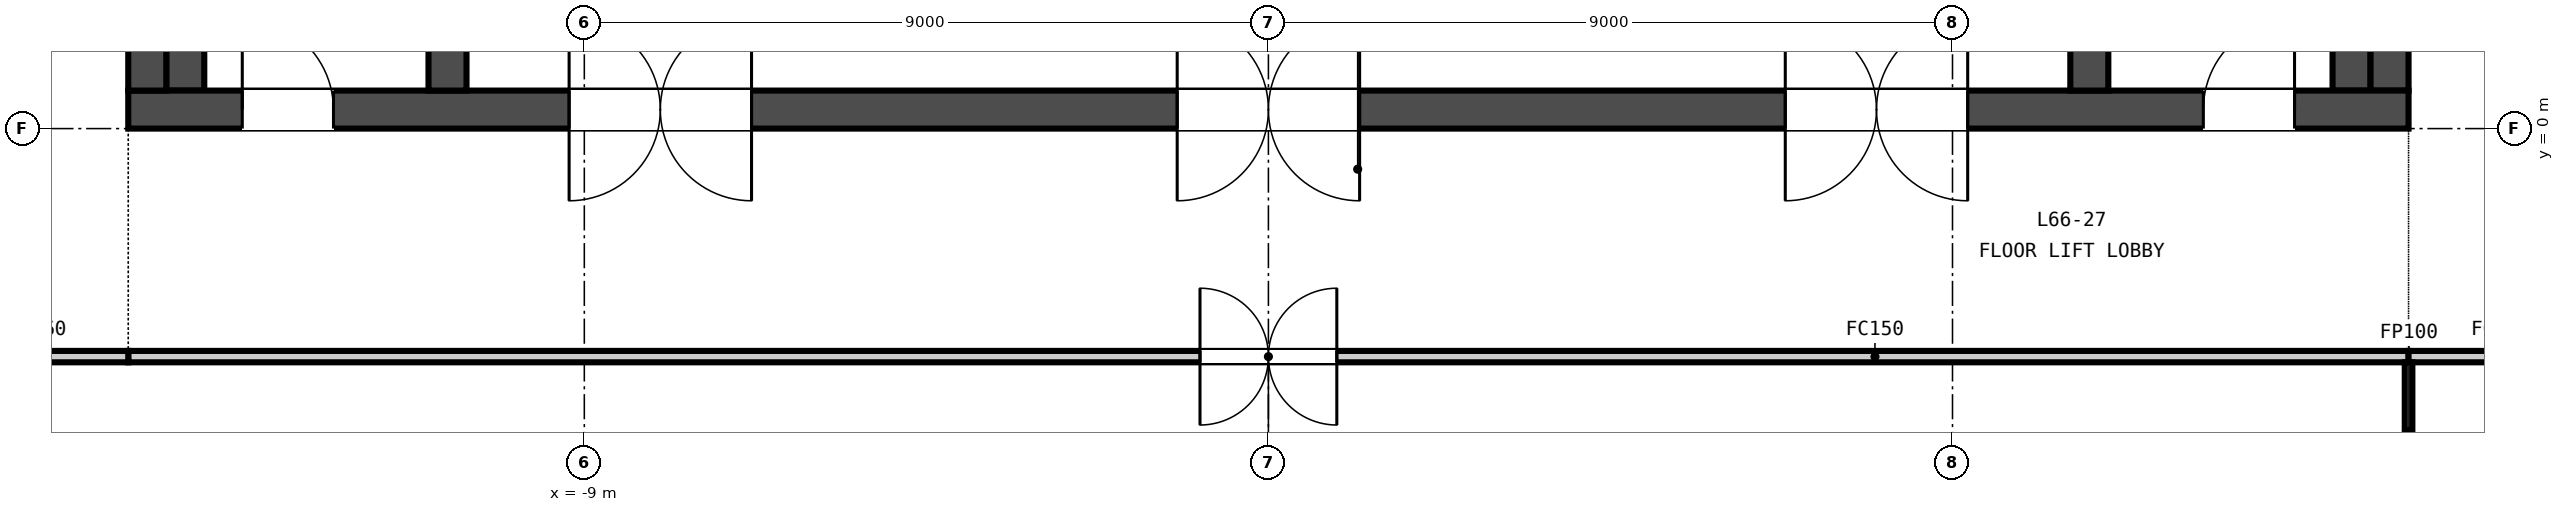
"""IFC4 building model, lengths in metres.
Left out: names, types, materials, properties, quantities, classifications, styles, units other than length and angle.
Written with IfcOpenShell. Run it as: python <this file> out.ifc"""

import sys

from ifc_helpers import new_model, si_unit, direction, frame, frame_2d, origin, place, context, subcontext, project, spatial, rectangle, extrude, element, fill, save


model = new_model("IFC4")
c1 = context("Model", 3, precision=1e-05, world=origin(), true_north=direction((0.0, 1.0)))
c2 = subcontext(c1, "Body", "Model", "MODEL_VIEW")
j1 = project(units=[si_unit("LENGTHUNIT", "METRE"), si_unit("PLANEANGLEUNIT", "RADIAN")], contexts=[c1])
p1 = place(None, origin())
s1 = spatial("IfcSite", under=j1, at=p1, CompositionType="ELEMENT")
p2 = place(p1, origin())
s2 = spatial("IfcBuilding", under=s1, at=p2, CompositionType="ELEMENT")
p3 = place(p2, frame((0.0, 0.0, 260.95)))
s3 = spatial("IfcBuildingStorey", under=s2, at=p3, CompositionType="ELEMENT", Elevation=260.95)
p4 = place(p3, frame((-15.0, 0.25, -0.15), z_axis=(0.0, 0.0, 1.0), x_axis=(1.0, 0.0, 0.0)))
e1 = element("IfcWall", 1, at=p4, inside=s3, PredefinedType="SOLIDWALL", context=c2, shape_type="SweptSolid", body=[
    extrude(rectangle(XDim=30.0, YDim=0.5, at=frame_2d((15.0, 0.0))), origin(), (0.0, 0.0, 1.0), 3.65),
])
p5 = place(p4, frame((5.8, 0.0, 0.15)))
e2 = element("IfcOpeningElement", 2, at=p5, cuts=e1, PredefinedType="OPENING", context=c2, shape_type="SweptSolid", body=[
    extrude(rectangle(XDim=2.4, YDim=2.4, at=frame_2d((1.2, 1.2))), frame((0.0, 0.26, 0.0), z_axis=(0.0, -1.0, 0.0), x_axis=(1.0, 0.0, 0.0)), (0.0, 0.0, 1.0), 0.52),
])
p6 = place(p4, frame((13.8, 0.0, 0.15)))
e3 = element("IfcOpeningElement", 3, at=p6, cuts=e1, PredefinedType="OPENING", context=c2, shape_type="SweptSolid", body=[
    extrude(rectangle(XDim=2.4, YDim=2.4, at=frame_2d((1.2, 1.2))), frame((0.0, 0.26, 0.0), z_axis=(0.0, -1.0, 0.0), x_axis=(1.0, 0.0, 0.0)), (0.0, 0.0, 1.0), 0.52),
])
p7 = place(p4, frame((21.8, 0.0, 0.15)))
e4 = element("IfcOpeningElement", 4, at=p7, cuts=e1, PredefinedType="OPENING", context=c2, shape_type="SweptSolid", body=[
    extrude(rectangle(XDim=2.4, YDim=2.4, at=frame_2d((1.2, 1.2))), frame((0.0, 0.26, 0.0), z_axis=(0.0, -1.0, 0.0), x_axis=(1.0, 0.0, 0.0)), (0.0, 0.0, 1.0), 0.52),
])
p8 = place(p4, frame((1.5, 0.0, 0.15)))
e5 = element("IfcOpeningElement", 5, at=p8, cuts=e1, PredefinedType="OPENING", context=c2, shape_type="SweptSolid", body=[
    extrude(rectangle(XDim=1.2, YDim=2.1, at=frame_2d((0.6, 1.05))), frame((0.0, 0.26, 0.0), z_axis=(0.0, -1.0, 0.0), x_axis=(1.0, 0.0, 0.0)), (0.0, 0.0, 1.0), 0.52),
])
p9 = place(p4, frame((27.3, 0.0, 0.15)))
e6 = element("IfcOpeningElement", 6, at=p9, cuts=e1, PredefinedType="OPENING", context=c2, shape_type="SweptSolid", body=[
    extrude(rectangle(XDim=1.2, YDim=2.1, at=frame_2d((0.6, 1.05))), frame((0.0, 0.26, 0.0), z_axis=(0.0, -1.0, 0.0), x_axis=(1.0, 0.0, 0.0)), (0.0, 0.0, 1.0), 0.52),
])
for number, where, z_axis, x_axis in (
    (7, (-14.75, 0.5, -0.15), (0.0, 0.0, 1.0), (0.0, 1.0, 0.0)),
    (8, (14.75, 0.5, -0.15), (0.0, 0.0, 1.0), (0.0, 1.0, 0.0)),
    (9, (-10.8, 0.5, -0.15), (0.0, 0.0, 1.0), (0.0, 1.0, 0.0)),
    (10, (10.8, 0.5, -0.15), (0.0, 0.0, 1.0), (0.0, 1.0, 0.0)),
):
    element("IfcWall", number, at=place(p3, frame(where, z_axis=z_axis, x_axis=x_axis)), inside=s3, PredefinedType="SOLIDWALL", context=c2, shape_type="SweptSolid", body=[
        extrude(rectangle(XDim=14.0, YDim=0.5, at=frame_2d((7.0, 0.0))), origin(), (0.0, 0.0, 1.0), 3.65),
    ])
for number, where, z_axis, x_axis in (
    (11, (-14.25, 0.5, 0.0), (0.0, 0.0, 1.0), (0.0, 1.0, 0.0)),
    (12, (14.25, 0.5, 0.0), (0.0, 0.0, 1.0), (0.0, 1.0, 0.0)),
):
    element("IfcWall", number, at=place(p3, frame(where, z_axis=z_axis, x_axis=x_axis)), inside=s3, PredefinedType="SOLIDWALL", context=c2, shape_type="SweptSolid", body=[
        extrude(rectangle(XDim=14.0, YDim=0.5, at=frame_2d((7.0, 0.0))), origin(), (0.0, 0.0, 1.0), 3.5),
    ])
p10 = place(p3, frame((15.0, -3.0, 0.0), z_axis=(0.0, 0.0, 1.0), x_axis=(-1.0, 0.0, 0.0)))
e13 = element("IfcWall", 13, at=p10, inside=s3, PredefinedType="PARTITIONING", context=c2, shape_type="SweptSolid", body=[
    extrude(rectangle(XDim=30.0, YDim=0.15, at=frame_2d((15.0, 0.0))), origin(), (0.0, 0.0, 1.0), 2.751),
])
p11 = place(p10, frame((14.1, 0.0, 0.0)))
e14 = element("IfcOpeningElement", 14, at=p11, cuts=e13, PredefinedType="OPENING", context=c2, shape_type="SweptSolid", body=[
    extrude(rectangle(XDim=1.8, YDim=2.1, at=frame_2d((0.9, 1.05))), frame((0.0, 0.085, 0.0), z_axis=(0.0, -1.0, 0.0), x_axis=(1.0, 0.0, 0.0)), (0.0, 0.0, 1.0), 0.17),
])
for number, where, z_axis, x_axis in (
    (15, (-15.0, -3.0, 0.0), (0.0, 0.0, 1.0), (-1.0, 0.0, 0.0)),
    (16, (17.4, -3.0, 0.0), (0.0, 0.0, 1.0), (-1.0, 0.0, 0.0)),
):
    element("IfcWall", number, at=place(p3, frame(where, z_axis=z_axis, x_axis=x_axis)), inside=s3, PredefinedType="PARTITIONING", context=c2, shape_type="SweptSolid", body=[
        extrude(rectangle(XDim=2.4, YDim=0.15, at=frame_2d((1.2, 0.0))), origin(), (0.0, 0.0, 1.0), 2.751),
    ])
p12 = place(p3, frame((15.0, -4.895, 0.0), z_axis=(0.0, 0.0, 1.0), x_axis=(0.0, 1.0, 0.0)))
e17 = element("IfcWall", 17, at=p12, inside=s3, PredefinedType="PARTITIONING", context=c2, shape_type="SweptSolid", body=[
    extrude(rectangle(XDim=1.82, YDim=0.1, at=frame_2d((0.91, 0.0))), origin(), (0.0, 0.0, 1.0), 2.751),
])
p13 = place(p5, origin())
e18 = element("IfcDoor", 18, at=p13, inside=s3, OperationType="DOUBLE_DOOR_DOUBLE_SWING", PredefinedType="DOOR", context=c2, shape_type="SweptSolid", body=[
    extrude(rectangle(XDim=2.4, YDim=2.4, at=frame_2d((1.2, 1.2))), frame((0.0, 0.025, 0.0), z_axis=(0.0, -1.0, 0.0), x_axis=(1.0, 0.0, 0.0)), (0.0, 0.0, 1.0), 0.05),
])
fill(e2, e18)
p14 = place(p6, origin())
e19 = element("IfcDoor", 19, at=p14, inside=s3, OperationType="DOUBLE_DOOR_DOUBLE_SWING", PredefinedType="DOOR", context=c2, shape_type="SweptSolid", body=[
    extrude(rectangle(XDim=2.4, YDim=2.4, at=frame_2d((1.2, 1.2))), frame((0.0, 0.025, 0.0), z_axis=(0.0, -1.0, 0.0), x_axis=(1.0, 0.0, 0.0)), (0.0, 0.0, 1.0), 0.05),
])
fill(e3, e19)
p15 = place(p7, origin())
e20 = element("IfcDoor", 20, at=p15, inside=s3, OperationType="DOUBLE_DOOR_DOUBLE_SWING", PredefinedType="DOOR", context=c2, shape_type="SweptSolid", body=[
    extrude(rectangle(XDim=2.4, YDim=2.4, at=frame_2d((1.2, 1.2))), frame((0.0, 0.025, 0.0), z_axis=(0.0, -1.0, 0.0), x_axis=(1.0, 0.0, 0.0)), (0.0, 0.0, 1.0), 0.05),
])
fill(e4, e20)
p16 = place(p8, origin())
e21 = element("IfcDoor", 21, at=p16, inside=s3, OperationType="SINGLE_SWING_LEFT", PredefinedType="DOOR", context=c2, shape_type="SweptSolid", body=[
    extrude(rectangle(XDim=1.2, YDim=2.1, at=frame_2d((0.6, 1.05))), frame((0.0, 0.025, 0.0), z_axis=(0.0, -1.0, 0.0), x_axis=(1.0, 0.0, 0.0)), (0.0, 0.0, 1.0), 0.05),
])
fill(e5, e21)
p17 = place(p9, origin())
e22 = element("IfcDoor", 22, at=p17, inside=s3, OperationType="SINGLE_SWING_RIGHT", PredefinedType="DOOR", context=c2, shape_type="SweptSolid", body=[
    extrude(rectangle(XDim=1.2, YDim=2.1, at=frame_2d((0.6, 1.05))), frame((0.0, 0.025, 0.0), z_axis=(0.0, -1.0, 0.0), x_axis=(1.0, 0.0, 0.0)), (0.0, 0.0, 1.0), 0.05),
])
fill(e6, e22)
p18 = place(p11, origin())
e23 = element("IfcDoor", 23, at=p18, inside=s3, OperationType="DOUBLE_DOOR_DOUBLE_SWING", PredefinedType="DOOR", context=c2, shape_type="SweptSolid", body=[
    extrude(rectangle(XDim=1.8, YDim=2.1, at=frame_2d((0.9, 1.05))), frame((0.0, 0.025, 0.0), z_axis=(0.0, -1.0, 0.0), x_axis=(1.0, 0.0, 0.0)), (0.0, 0.0, 1.0), 0.05),
])
fill(e14, e23)
save(model, sys.argv[1])
